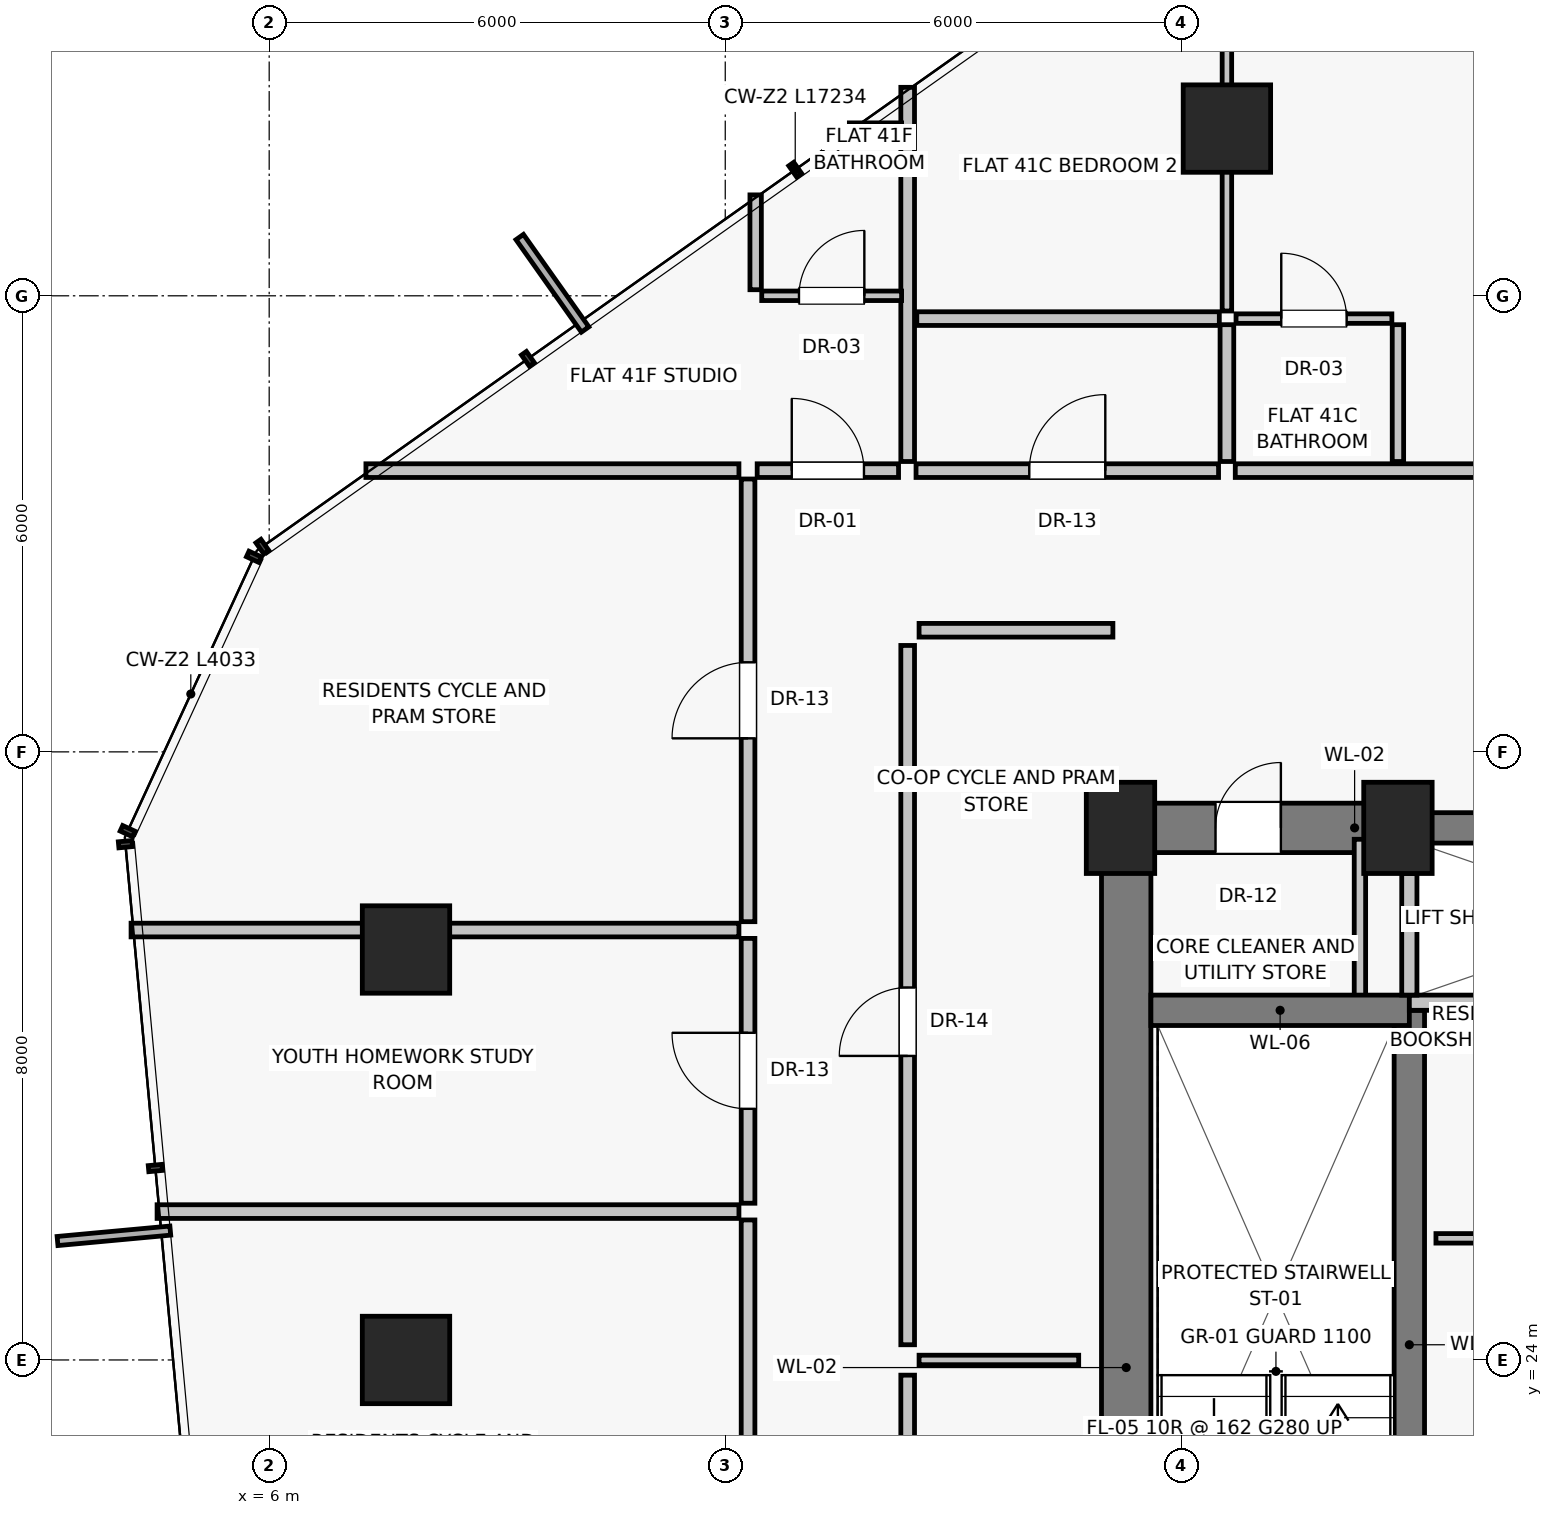
"""IFC4 building model, lengths in metres.
Left out: names, types, materials, properties, quantities, classifications, styles, units other than length and angle.
Written with IfcOpenShell. Run it as: python <this file> out.ifc"""

import sys

from ifc_helpers import new_model, si_unit, direction, frame, frame_2d, origin, origin_2d, place, context, subcontext, project, spatial, rectangle, extrude, source, transform, mapped, element, fill, save


model = new_model("IFC4")
c1 = context("Model", 3, precision=1e-05, world=origin(), true_north=direction((0.0, 1.0)))
c2 = subcontext(c1, "Body", "Model", "MODEL_VIEW")
j1 = project(units=[si_unit("LENGTHUNIT", "METRE"), si_unit("PLANEANGLEUNIT", "RADIAN")], contexts=[c1])
p1 = place(None, origin())
s1 = spatial("IfcSite", under=j1, at=p1, CompositionType="ELEMENT")
p2 = place(p1, origin())
s2 = spatial("IfcBuilding", under=s1, at=p2, CompositionType="ELEMENT")
p3 = place(p2, frame((0.0, 0.0, 145.75)))
s3 = spatial("IfcBuildingStorey", under=s2, at=p3, CompositionType="ELEMENT", Elevation=145.75)
for number, where, z_axis, x_axis in (
    (1, (17.2, 31.0, 0.0), (0.0, 0.0, 1.0), (1.0, 0.0, 0.0)),
    (2, (20.85, 31.0, 0.0), (0.0, 0.0, 1.0), (1.0, 0.0, 0.0)),
):
    element("IfcColumn", number, at=place(p3, frame(where, z_axis=z_axis, x_axis=x_axis)), inside=s3, PredefinedType="PILASTER", context=c2, shape_type="SweptSolid", body=[
        extrude(rectangle(XDim=0.9, YDim=1.2, at=origin_2d()), origin(), (0.0, 0.0, 1.0), 3.25),
    ])
for number, where, z_axis, x_axis in (
    (3, (18.6, 40.2, 0.0), (0.0, 0.0, 1.0), (1.0, 0.0, 0.0)),
    (4, (7.8, 29.4, 0.0), (0.0, 0.0, 1.0), (1.0, 0.0, 0.0)),
    (5, (7.8, 24.0, 0.0), (0.0, 0.0, 1.0), (1.0, 0.0, 0.0)),
):
    element("IfcColumn", number, at=place(p3, frame(where, z_axis=z_axis, x_axis=x_axis)), inside=s3, PredefinedType="COLUMN", context=c2, shape_type="SweptSolid", body=[
        extrude(rectangle(XDim=1.15, YDim=1.15, at=origin_2d()), origin(), (0.0, 0.0, 1.0), 3.25),
    ])
p4 = place(p3, frame((17.275, 16.8, 0.0), z_axis=(0.0, 0.0, 1.0), x_axis=(0.0, 1.0, 0.0)))
e6 = element("IfcWall", 6, at=p4, inside=s3, PredefinedType="SHEAR", context=c2, shape_type="SweptSolid", body=[
    extrude(rectangle(XDim=14.2, YDim=0.65, at=frame_2d((7.1, 0.0))), origin(), (0.0, 0.0, 1.0), 3.0),
])
p5 = place(p3, frame((17.2, 31.0, 0.0), z_axis=(0.0, 0.0, 1.0), x_axis=(1.0, 0.0, 0.0)))
e7 = element("IfcWall", 7, at=p5, inside=s3, PredefinedType="SHEAR", context=c2, shape_type="SweptSolid", body=[
    extrude(rectangle(XDim=3.8, YDim=0.65, at=frame_2d((1.9, 0.0))), origin(), (0.0, 0.0, 1.0), 3.0),
])
p6 = place(p5, frame((1.25, 0.0, 0.0)))
e8 = element("IfcOpeningElement", 8, at=p6, cuts=e7, PredefinedType="OPENING", context=c2, shape_type="SweptSolid", body=[
    extrude(rectangle(XDim=0.86, YDim=2.01, at=frame_2d((0.43, 1.005))), frame((0.0, 0.335, 0.0), z_axis=(0.0, -1.0, 0.0), x_axis=(1.0, 0.0, 0.0)), (0.0, 0.0, 1.0), 0.67),
])
p7 = place(p3, frame((21.0, 31.0, 0.0), z_axis=(0.0, 0.0, 1.0), x_axis=(1.0, 0.0, 0.0)))
e9 = element("IfcWall", 9, at=p7, inside=s3, PredefinedType="SHEAR", context=c2, shape_type="SweptSolid", body=[
    extrude(rectangle(XDim=6.0, YDim=0.4, at=frame_2d((3.0, 0.0))), origin(), (0.0, 0.0, 1.0), 3.0),
])
p8 = place(p3, frame((20.35, 28.65, 0.0), z_axis=(0.0, 0.0, 1.0), x_axis=(0.0, 1.0, 0.0)))
e10 = element("IfcWall", 10, at=p8, inside=s3, PredefinedType="PARTITIONING", context=c2, shape_type="SweptSolid", body=[
    extrude(rectangle(XDim=2.2, YDim=0.15, at=frame_2d((1.1, 0.0))), origin(), (0.0, 0.0, 1.0), 3.0),
])
p9 = place(p3, frame((21.0, 19.8, 0.0), z_axis=(0.0, 0.0, 1.0), x_axis=(0.0, 1.0, 0.0)))
e11 = element("IfcWall", 11, at=p9, inside=s3, PredefinedType="SHEAR", context=c2, shape_type="SweptSolid", body=[
    extrude(rectangle(XDim=8.8, YDim=0.4, at=frame_2d((4.4, 0.0))), origin(), (0.0, 0.0, 1.0), 3.0),
])
p10 = place(p3, frame((17.6, 28.6, 0.0), z_axis=(0.0, 0.0, 1.0), x_axis=(1.0, 0.0, 0.0)))
e12 = element("IfcWall", 12, at=p10, inside=s3, PredefinedType="SHEAR", context=c2, shape_type="SweptSolid", body=[
    extrude(rectangle(XDim=3.4, YDim=0.4, at=frame_2d((1.7, 0.0))), origin(), (0.0, 0.0, 1.0), 3.0),
])
p11 = place(p3, frame((21.0, 28.7, 0.0), z_axis=(0.0, 0.0, 1.0), x_axis=(1.0, 0.0, 0.0)))
e13 = element("IfcWall", 13, at=p11, inside=s3, PredefinedType="SOLIDWALL", context=c2, shape_type="SweptSolid", body=[
    extrude(rectangle(XDim=6.0, YDim=0.2, at=frame_2d((3.0, 0.0))), origin(), (0.0, 0.0, 1.0), 3.0),
])
p12 = place(p3, frame((21.0, 28.8, 0.0), z_axis=(0.0, 0.0, 1.0), x_axis=(0.0, 1.0, 0.0)))
e14 = element("IfcWall", 14, at=p12, inside=s3, PredefinedType="SOLIDWALL", context=c2, shape_type="SweptSolid", body=[
    extrude(rectangle(XDim=1.6, YDim=0.2, at=frame_2d((0.8, 0.0))), origin(), (0.0, 0.0, 1.0), 3.0),
])
p13 = place(p3, frame((21.35, 25.6, 0.0), z_axis=(0.0, 0.0, 1.0), x_axis=(1.0, 0.0, 0.0)))
e15 = element("IfcWall", 15, at=p13, inside=s3, PredefinedType="PARTITIONING", context=c2, shape_type="SweptSolid", body=[
    extrude(rectangle(XDim=2.4, YDim=0.125, at=frame_2d((1.2, 0.0))), origin(), (0.0, 0.0, 1.0), 3.0),
])
p14 = place(p3, frame((14.4, 14.4, 0.0), z_axis=(0.0, 0.0, 1.0), x_axis=(0.0, 1.0, 0.0)))
e16 = element("IfcWall", 16, at=p14, inside=s3, PredefinedType="PARTITIONING", context=c2, shape_type="SweptSolid", body=[
    extrude(rectangle(XDim=9.4, YDim=0.18, at=frame_2d((4.7, 0.0))), origin(), (0.0, 0.0, 1.0), 3.0),
])
p15 = place(p14, frame((3.8, 0.0, 0.0)))
e17 = element("IfcOpeningElement", 17, at=p15, cuts=e16, PredefinedType="OPENING", context=c2, shape_type="SweptSolid", body=[
    extrude(rectangle(XDim=0.9, YDim=2.01, at=frame_2d((0.45, 1.005))), frame((0.0, 0.1, 0.0), z_axis=(0.0, -1.0, 0.0), x_axis=(1.0, 0.0, 0.0)), (0.0, 0.0, 1.0), 0.2),
])
p16 = place(p3, frame((14.4, 24.2, 0.0), z_axis=(0.0, 0.0, 1.0), x_axis=(0.0, 1.0, 0.0)))
e18 = element("IfcWall", 18, at=p16, inside=s3, PredefinedType="PARTITIONING", context=c2, shape_type="SweptSolid", body=[
    extrude(rectangle(XDim=9.2, YDim=0.18, at=frame_2d((4.6, 0.0))), origin(), (0.0, 0.0, 1.0), 3.0),
])
p17 = place(p16, frame((3.8, 0.0, 0.0)))
e19 = element("IfcOpeningElement", 19, at=p17, cuts=e18, PredefinedType="OPENING", context=c2, shape_type="SweptSolid", body=[
    extrude(rectangle(XDim=0.9, YDim=2.01, at=frame_2d((0.45, 1.005))), frame((0.0, 0.1, 0.0), z_axis=(0.0, -1.0, 0.0), x_axis=(1.0, 0.0, 0.0)), (0.0, 0.0, 1.0), 0.2),
])
p18 = place(p3, frame((14.55, 24.0, 0.0), z_axis=(0.0, 0.0, 1.0), x_axis=(1.0, 0.0, 0.0)))
e20 = element("IfcWall", 20, at=p18, inside=s3, PredefinedType="PARTITIONING", context=c2, shape_type="SweptSolid", body=[
    extrude(rectangle(XDim=2.1, YDim=0.125, at=frame_2d((1.05, 0.0))), origin(), (0.0, 0.0, 1.0), 3.0),
])
p19 = place(p3, frame((14.55, 33.6, 0.0), z_axis=(0.0, 0.0, 1.0), x_axis=(1.0, 0.0, 0.0)))
e21 = element("IfcWall", 21, at=p19, inside=s3, PredefinedType="PARTITIONING", context=c2, shape_type="SweptSolid", body=[
    extrude(rectangle(XDim=2.55, YDim=0.18, at=frame_2d((1.275, 0.0))), origin(), (0.0, 0.0, 1.0), 3.0),
])
p20 = place(p3, frame((14.4, 35.82, 0.0), z_axis=(0.0, 0.0, 1.0), x_axis=(0.0, 1.0, 0.0)))
e22 = element("IfcWall", 22, at=p20, inside=s3, PredefinedType="PARTITIONING", context=c2, shape_type="SweptSolid", body=[
    extrude(rectangle(XDim=4.923, YDim=0.18, at=frame_2d((2.461, 0.0))), origin(), (0.0, 0.0, 1.0), 3.0),
])
p21 = place(p3, frame((14.51, 35.7, 0.0), z_axis=(0.0, 0.0, 1.0), x_axis=(1.0, 0.0, 0.0)))
e23 = element("IfcWall", 23, at=p21, inside=s3, PredefinedType="PARTITIONING", context=c2, shape_type="SweptSolid", body=[
    extrude(rectangle(XDim=3.98, YDim=0.18, at=frame_2d((1.99, 0.0))), origin(), (0.0, 0.0, 1.0), 2.58),
])
p22 = place(p21, frame((1.49, 0.0, 0.0)))
e24 = element("IfcOpeningElement", 24, at=p22, cuts=e23, PredefinedType="OPENING", context=c2, shape_type="SweptSolid", body=[
    extrude(rectangle(XDim=1.0, YDim=2.01, at=frame_2d((0.5, 1.005))), frame((0.0, 0.1, 0.0), z_axis=(0.0, -1.0, 0.0), x_axis=(1.0, 0.0, 0.0)), (0.0, 0.0, 1.0), 0.2),
])
p23 = place(p3, frame((18.71, 35.7, 0.0), z_axis=(0.0, 0.0, 1.0), x_axis=(1.0, 0.0, 0.0)))
e25 = element("IfcWall", 25, at=p23, inside=s3, PredefinedType="PARTITIONING", context=c2, shape_type="SweptSolid", body=[
    extrude(rectangle(XDim=14.78, YDim=0.18, at=frame_2d((7.39, 0.0))), origin(), (0.0, 0.0, 1.0), 2.58),
])
p24 = place(p23, frame((5.94, 0.0, 0.0)))
e26 = element("IfcOpeningElement", 26, at=p24, cuts=e25, PredefinedType="OPENING", context=c2, shape_type="SweptSolid", body=[
    extrude(rectangle(XDim=0.95, YDim=2.02, at=frame_2d((0.475, 1.01))), frame((0.0, 0.1, 0.0), z_axis=(0.0, -1.0, 0.0), x_axis=(1.0, 0.0, 0.0)), (0.0, 0.0, 1.0), 0.2),
])
p25 = place(p3, frame((14.52, 37.7, 0.0), z_axis=(0.0, 0.0, 1.0), x_axis=(1.0, 0.0, 0.0)))
e27 = element("IfcWall", 27, at=p25, inside=s3, PredefinedType="PARTITIONING", context=c2, shape_type="SweptSolid", body=[
    extrude(rectangle(XDim=3.98, YDim=0.18, at=frame_2d((1.99, 0.0))), origin(), (0.0, 0.0, 1.0), 3.0),
])
p26 = place(p3, frame((18.6, 35.82, 0.0), z_axis=(0.0, 0.0, 1.0), x_axis=(0.0, 1.0, 0.0)))
e28 = element("IfcWall", 28, at=p26, inside=s3, PredefinedType="PARTITIONING", context=c2, shape_type="SweptSolid", body=[
    extrude(rectangle(XDim=1.8, YDim=0.18, at=frame_2d((0.9, 0.0))), origin(), (0.0, 0.0, 1.0), 2.378),
])
p27 = place(p3, frame((18.6, 37.8, 0.0), z_axis=(0.0, 0.0, 1.0), x_axis=(0.0, 1.0, 0.0)))
e29 = element("IfcWall", 29, at=p27, inside=s3, PredefinedType="PARTITIONING", context=c2, shape_type="SweptSolid", body=[
    extrude(rectangle(XDim=5.914, YDim=0.125, at=frame_2d((2.957, 0.0))), origin(), (0.0, 0.0, 1.0), 2.378),
])
p28 = place(p27, frame((3.853, 0.0, 0.0)))
e30 = element("IfcOpeningElement", 30, at=p28, cuts=e29, PredefinedType="OPENING", context=c2, shape_type="SweptSolid", body=[
    extrude(rectangle(XDim=0.9, YDim=2.01, at=frame_2d((0.45, 1.005))), frame((0.0, 0.073, 0.0), z_axis=(0.0, -1.0, 0.0), x_axis=(1.0, 0.0, 0.0)), (0.0, 0.0, 1.0), 0.145),
])
p29 = place(p3, frame((20.85, 35.82, 0.0), z_axis=(0.0, 0.0, 1.0), x_axis=(0.0, 1.0, 0.0)))
e31 = element("IfcWall", 31, at=p29, inside=s3, PredefinedType="PARTITIONING", context=c2, shape_type="SweptSolid", body=[
    extrude(rectangle(XDim=1.8, YDim=0.15, at=frame_2d((0.9, 0.0))), origin(), (0.0, 0.0, 1.0), 3.0),
])
p30 = place(p3, frame((18.72, 37.7, 0.0), z_axis=(0.0, 0.0, 1.0), x_axis=(1.0, 0.0, 0.0)))
e32 = element("IfcWall", 32, at=p30, inside=s3, PredefinedType="PARTITIONING", context=c2, shape_type="SweptSolid", body=[
    extrude(rectangle(XDim=2.05, YDim=0.125, at=frame_2d((1.025, 0.0))), origin(), (0.0, 0.0, 1.0), 3.0),
])
p31 = place(p30, frame((0.595, 0.0, 0.0)))
e33 = element("IfcOpeningElement", 33, at=p31, cuts=e32, PredefinedType="OPENING", context=c2, shape_type="SweptSolid", body=[
    extrude(rectangle(XDim=0.86, YDim=2.01, at=frame_2d((0.43, 1.005))), frame((0.0, 0.073, 0.0), z_axis=(0.0, -1.0, 0.0), x_axis=(1.0, 0.0, 0.0)), (0.0, 0.0, 1.0), 0.145),
])
p32 = place(p3, frame((12.18, 35.7, 0.0), z_axis=(0.0, 0.0, 1.0), x_axis=(-1.0, 0.0, 0.0)))
e34 = element("IfcWall", 34, at=p32, inside=s3, PredefinedType="PARTITIONING", context=c2, shape_type="SweptSolid", body=[
    extrude(rectangle(XDim=4.907, YDim=0.18, at=frame_2d((2.454, 0.0))), origin(), (0.0, 0.0, 1.0), 3.0),
])
p33 = place(p3, frame((12.3, 17.474, 0.0), z_axis=(0.0, 0.0, 1.0), x_axis=(0.0, 1.0, 0.0)))
e35 = element("IfcWall", 35, at=p33, inside=s3, PredefinedType="PARTITIONING", context=c2, shape_type="SweptSolid", body=[
    extrude(rectangle(XDim=8.368, YDim=0.18, at=frame_2d((4.184, 0.0))), origin(), (0.0, 0.0, 1.0), 2.58),
])
p34 = place(p33, frame((3.684, 0.0, 0.0)))
e36 = element("IfcOpeningElement", 36, at=p34, cuts=e35, PredefinedType="OPENING", context=c2, shape_type="SweptSolid", body=[
    extrude(rectangle(XDim=1.0, YDim=2.01, at=frame_2d((0.5, 1.005))), frame((0.0, 0.1, 0.0), z_axis=(0.0, -1.0, 0.0), x_axis=(1.0, 0.0, 0.0)), (0.0, 0.0, 1.0), 0.2),
])
p35 = place(p3, frame((12.18, 25.952, 0.0), z_axis=(0.0, 0.0, 1.0), x_axis=(-1.0, 0.0, 0.0)))
e37 = element("IfcWall", 37, at=p35, inside=s3, PredefinedType="PARTITIONING", context=c2, shape_type="SweptSolid", body=[
    extrude(rectangle(XDim=7.655, YDim=0.18, at=frame_2d((3.827, 0.0))), origin(), (0.0, 0.0, 1.0), 3.0),
])
p36 = place(p3, frame((12.3, 26.062, 0.0), z_axis=(0.0, 0.0, 1.0), x_axis=(0.0, 1.0, 0.0)))
e38 = element("IfcWall", 38, at=p36, inside=s3, PredefinedType="PARTITIONING", context=c2, shape_type="SweptSolid", body=[
    extrude(rectangle(XDim=3.484, YDim=0.18, at=frame_2d((1.742, 0.0))), origin(), (0.0, 0.0, 1.0), 2.58),
])
p37 = place(p36, frame((1.242, 0.0, 0.0)))
e39 = element("IfcOpeningElement", 39, at=p37, cuts=e38, PredefinedType="OPENING", context=c2, shape_type="SweptSolid", body=[
    extrude(rectangle(XDim=1.0, YDim=2.01, at=frame_2d((0.5, 1.005))), frame((0.0, 0.1, 0.0), z_axis=(0.0, -1.0, 0.0), x_axis=(1.0, 0.0, 0.0)), (0.0, 0.0, 1.0), 0.2),
])
p38 = place(p3, frame((12.3, 29.766, 0.0), z_axis=(0.0, 0.0, 1.0), x_axis=(0.0, 1.0, 0.0)))
e40 = element("IfcWall", 40, at=p38, inside=s3, PredefinedType="PARTITIONING", context=c2, shape_type="SweptSolid", body=[
    extrude(rectangle(XDim=5.824, YDim=0.18, at=frame_2d((2.912, 0.0))), origin(), (0.0, 0.0, 1.0), 2.58),
])
p39 = place(p38, frame((2.412, 0.0, 0.0)))
e41 = element("IfcOpeningElement", 41, at=p39, cuts=e40, PredefinedType="OPENING", context=c2, shape_type="SweptSolid", body=[
    extrude(rectangle(XDim=1.0, YDim=2.01, at=frame_2d((0.5, 1.005))), frame((0.0, 0.1, 0.0), z_axis=(0.0, -1.0, 0.0), x_axis=(1.0, 0.0, 0.0)), (0.0, 0.0, 1.0), 0.2),
])
p40 = place(p3, frame((12.18, 29.656, 0.0), z_axis=(0.0, 0.0, 1.0), x_axis=(-1.0, 0.0, 0.0)))
e42 = element("IfcWall", 42, at=p40, inside=s3, PredefinedType="PARTITIONING", context=c2, shape_type="SweptSolid", body=[
    extrude(rectangle(XDim=7.997, YDim=0.18, at=frame_2d((3.999, 0.0))), origin(), (0.0, 0.0, 1.0), 2.378),
])
p41 = place(p3, frame((12.42, 35.7, 0.0), z_axis=(0.0, 0.0, 1.0), x_axis=(1.0, 0.0, 0.0)))
e43 = element("IfcWall", 43, at=p41, inside=s3, PredefinedType="PARTITIONING", context=c2, shape_type="SweptSolid", body=[
    extrude(rectangle(XDim=1.86, YDim=0.18, at=frame_2d((0.93, 0.0))), origin(), (0.0, 0.0, 1.0), 3.0),
])
p42 = place(p41, frame((0.455, 0.0, 0.0)))
e44 = element("IfcOpeningElement", 44, at=p42, cuts=e43, PredefinedType="OPENING", context=c2, shape_type="SweptSolid", body=[
    extrude(rectangle(XDim=0.95, YDim=2.02, at=frame_2d((0.475, 1.01))), frame((0.0, 0.1, 0.0), z_axis=(0.0, -1.0, 0.0), x_axis=(1.0, 0.0, 0.0)), (0.0, 0.0, 1.0), 0.2),
])
p43 = place(p3, frame((12.48, 38.0, 0.0), z_axis=(0.0, 0.0, 1.0), x_axis=(1.0, 0.0, 0.0)))
e45 = element("IfcWall", 45, at=p43, inside=s3, PredefinedType="PARTITIONING", context=c2, shape_type="SweptSolid", body=[
    extrude(rectangle(XDim=1.84, YDim=0.125, at=frame_2d((0.92, 0.0))), origin(), (0.0, 0.0, 1.0), 3.0),
])
p44 = place(p43, frame((0.49, 0.0, 0.0)))
e46 = element("IfcOpeningElement", 46, at=p44, cuts=e45, PredefinedType="OPENING", context=c2, shape_type="SweptSolid", body=[
    extrude(rectangle(XDim=0.86, YDim=2.01, at=frame_2d((0.43, 1.005))), frame((0.0, 0.073, 0.0), z_axis=(0.0, -1.0, 0.0), x_axis=(1.0, 0.0, 0.0)), (0.0, 0.0, 1.0), 0.145),
])
p45 = place(p3, frame((13.633, 40.2, 0.0), z_axis=(0.0, 0.0, 1.0), x_axis=(1.0, 0.0, 0.0)))
e47 = element("IfcWall", 47, at=p45, inside=s3, PredefinedType="PARTITIONING", context=c2, shape_type="SweptSolid", body=[
    extrude(rectangle(XDim=0.687, YDim=0.15, at=frame_2d((0.344, 0.0))), origin(), (0.0, 0.0, 1.0), 3.0),
])
p46 = place(p3, frame((12.4, 38.08, 0.0), z_axis=(0.0, 0.0, 1.0), x_axis=(0.0, 1.0, 0.0)))
e48 = element("IfcWall", 48, at=p46, inside=s3, PredefinedType="PARTITIONING", context=c2, shape_type="SweptSolid", body=[
    extrude(rectangle(XDim=1.248, YDim=0.15, at=frame_2d((0.624, 0.0))), origin(), (0.0, 0.0, 1.0), 3.0),
])
m1 = source(origin(), c2, "Body", "SweptSolid", [
    extrude(rectangle(XDim=0.86, YDim=2.01, at=frame_2d((0.43, 1.005))), frame((0.0, 0.025, 0.0), z_axis=(0.0, -1.0, 0.0), x_axis=(1.0, 0.0, 0.0)), (0.0, 0.0, 1.0), 0.05),
])
p47 = place(p6, origin())
e49 = element("IfcDoor", 49, at=p47, inside=s3, OperationType="SINGLE_SWING_RIGHT", PredefinedType="DOOR", context=c2, shape_type="MappedRepresentation", body=[
    mapped(m1, transform((0.0, 0.0, 0.0), scale=1.0)),
])
fill(e8, e49)
m2 = source(origin(), c2, "Body", "SweptSolid", [
    extrude(rectangle(XDim=0.9, YDim=2.01, at=frame_2d((0.45, 1.005))), frame((0.0, 0.025, 0.0), z_axis=(0.0, -1.0, 0.0), x_axis=(1.0, 0.0, 0.0)), (0.0, 0.0, 1.0), 0.05),
])
p48 = place(p17, origin())
e50 = element("IfcDoor", 50, at=p48, inside=s3, OperationType="SINGLE_SWING_LEFT", PredefinedType="DOOR", context=c2, shape_type="MappedRepresentation", body=[
    mapped(m2, transform((0.0, 0.0, 0.0), scale=1.0)),
])
fill(e19, e50)
m3 = source(origin(), c2, "Body", "SweptSolid", [
    extrude(rectangle(XDim=1.0, YDim=2.01, at=frame_2d((0.5, 1.005))), frame((0.0, 0.025, 0.0), z_axis=(0.0, -1.0, 0.0), x_axis=(1.0, 0.0, 0.0)), (0.0, 0.0, 1.0), 0.05),
])
p49 = place(p22, origin())
e51 = element("IfcDoor", 51, at=p49, inside=s3, OperationType="SINGLE_SWING_RIGHT", PredefinedType="DOOR", context=c2, shape_type="MappedRepresentation", body=[
    mapped(m3, transform((0.0, 0.0, 0.0), scale=1.0)),
])
fill(e24, e51)
p50 = place(p31, origin())
e52 = element("IfcDoor", 52, at=p50, inside=s3, OperationType="SINGLE_SWING_LEFT", PredefinedType="DOOR", context=c2, shape_type="MappedRepresentation", body=[
    mapped(m1, transform((0.0, 0.0, 0.0), scale=1.0)),
])
fill(e33, e52)
p51 = place(p37, origin())
e53 = element("IfcDoor", 53, at=p51, inside=s3, OperationType="SINGLE_SWING_RIGHT", PredefinedType="DOOR", context=c2, shape_type="MappedRepresentation", body=[
    mapped(m3, transform((0.0, 0.0, 0.0), scale=1.0)),
])
fill(e39, e53)
p52 = place(p39, origin())
e54 = element("IfcDoor", 54, at=p52, inside=s3, OperationType="SINGLE_SWING_LEFT", PredefinedType="DOOR", context=c2, shape_type="MappedRepresentation", body=[
    mapped(m3, transform((0.0, 0.0, 0.0), scale=1.0)),
])
fill(e41, e54)
m4 = source(origin(), c2, "Body", "SweptSolid", [
    extrude(rectangle(XDim=0.95, YDim=2.02, at=frame_2d((0.475, 1.01))), frame((0.0, 0.025, 0.0), z_axis=(0.0, -1.0, 0.0), x_axis=(1.0, 0.0, 0.0)), (0.0, 0.0, 1.0), 0.05),
])
p53 = place(p42, origin())
e55 = element("IfcDoor", 55, at=p53, inside=s3, OperationType="SINGLE_SWING_LEFT", PredefinedType="DOOR", context=c2, shape_type="MappedRepresentation", body=[
    mapped(m4, transform((0.0, 0.0, 0.0), scale=1.0)),
])
fill(e44, e55)
p54 = place(p44, origin())
e56 = element("IfcDoor", 56, at=p54, inside=s3, OperationType="SINGLE_SWING_RIGHT", PredefinedType="DOOR", context=c2, shape_type="MappedRepresentation", body=[
    mapped(m1, transform((0.0, 0.0, 0.0), scale=1.0)),
])
fill(e46, e56)
save(model, sys.argv[1])
